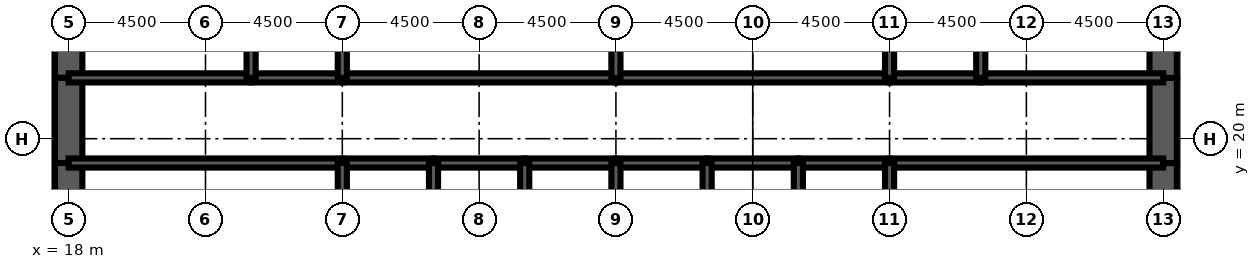
"""IFC4 building model, lengths in metres.
Left out: names, types, materials, properties, quantities, classifications, styles, units other than length and angle.
Written with IfcOpenShell. Run it as: python <this file> out.ifc"""

import sys

from ifc_helpers import new_model, si_unit, direction, frame, frame_2d, origin, place, context, subcontext, project, spatial, rectangle, extrude, element, fill, save


model = new_model("IFC4")
c1 = context("Model", 3, precision=1e-05, world=origin(), true_north=direction((0.0, 1.0)))
c2 = subcontext(c1, "Body", "Model", "MODEL_VIEW")
j1 = project(units=[si_unit("LENGTHUNIT", "METRE"), si_unit("PLANEANGLEUNIT", "RADIAN")], contexts=[c1])
p1 = place(None, origin())
s1 = spatial("IfcSite", under=j1, at=p1, CompositionType="ELEMENT")
p2 = place(p1, origin())
s2 = spatial("IfcBuilding", under=s1, at=p2, CompositionType="ELEMENT")
p3 = place(p2, frame((0.0, 0.0, 155.1)))
s3 = spatial("IfcBuildingStorey", under=s2, at=p3, CompositionType="ELEMENT", Elevation=155.1)
p4 = place(p3, frame((18.0, 26.0, 0.0), z_axis=(0.0, 0.0, 1.0), x_axis=(0.0, -1.0, 0.0)))
e1 = element("IfcWall", 1, at=p4, inside=s3, PredefinedType="SHEAR", context=c2, shape_type="SweptSolid", body=[
    extrude(rectangle(XDim=4.0, YDim=0.9, at=frame_2d((2.0, 0.0))), origin(), (0.0, 0.0, 1.0), 4.2),
])
p5 = place(p3, frame((18.0, 22.0, 0.0), z_axis=(0.0, 0.0, 1.0), x_axis=(0.0, -1.0, 0.0)))
e2 = element("IfcWall", 2, at=p5, inside=s3, PredefinedType="SHEAR", context=c2, shape_type="SweptSolid", body=[
    extrude(rectangle(XDim=2.8, YDim=0.9, at=frame_2d((1.4, 0.0))), origin(), (0.0, 0.0, 1.0), 4.2),
])
p6 = place(p5, frame((0.6, 0.0, 0.0)))
e3 = element("IfcOpeningElement", 3, at=p6, cuts=e2, PredefinedType="OPENING", context=c2, shape_type="SweptSolid", body=[
    extrude(rectangle(XDim=1.8, YDim=2.1, at=frame_2d((0.9, 1.05))), frame((0.0, 0.46, 0.0), z_axis=(0.0, -1.0, 0.0), x_axis=(1.0, 0.0, 0.0)), (0.0, 0.0, 1.0), 0.92),
])
for number, where, z_axis, x_axis in (
    (4, (18.0, 19.2, 0.0), (0.0, 0.0, 1.0), (0.0, -1.0, 0.0)),
    (5, (54.0, 16.0, 0.0), (0.0, 0.0, 1.0), (0.0, 1.0, 0.0)),
):
    element("IfcWall", number, at=place(p3, frame(where, z_axis=z_axis, x_axis=x_axis)), inside=s3, PredefinedType="SHEAR", context=c2, shape_type="SweptSolid", body=[
        extrude(rectangle(XDim=3.2, YDim=0.9, at=frame_2d((1.6, 0.0))), origin(), (0.0, 0.0, 1.0), 4.2),
    ])
p7 = place(p3, frame((54.0, 19.2, 0.0), z_axis=(0.0, 0.0, 1.0), x_axis=(0.0, 1.0, 0.0)))
e6 = element("IfcWall", 6, at=p7, inside=s3, PredefinedType="SHEAR", context=c2, shape_type="SweptSolid", body=[
    extrude(rectangle(XDim=2.8, YDim=0.9, at=frame_2d((1.4, 0.0))), origin(), (0.0, 0.0, 1.0), 4.2),
])
p8 = place(p7, frame((0.4, 0.0, 0.0)))
e7 = element("IfcOpeningElement", 7, at=p8, cuts=e6, PredefinedType="OPENING", context=c2, shape_type="SweptSolid", body=[
    extrude(rectangle(XDim=1.8, YDim=2.1, at=frame_2d((0.9, 1.05))), frame((0.0, 0.46, 0.0), z_axis=(0.0, -1.0, 0.0), x_axis=(1.0, 0.0, 0.0)), (0.0, 0.0, 1.0), 0.92),
])
p9 = place(p3, frame((54.0, 22.0, 0.0), z_axis=(0.0, 0.0, 1.0), x_axis=(0.0, 1.0, 0.0)))
e8 = element("IfcWall", 8, at=p9, inside=s3, PredefinedType="SHEAR", context=c2, shape_type="SweptSolid", body=[
    extrude(rectangle(XDim=4.0, YDim=0.9, at=frame_2d((2.0, 0.0))), origin(), (0.0, 0.0, 1.0), 4.2),
])
p10 = place(p3, frame((18.0, 19.2, 0.0), z_axis=(0.0, 0.0, 1.0), x_axis=(1.0, 0.0, 0.0)))
e9 = element("IfcWall", 9, at=p10, inside=s3, PredefinedType="SOLIDWALL", context=c2, shape_type="SweptSolid", body=[
    extrude(rectangle(XDim=9.0, YDim=0.3, at=frame_2d((4.5, 0.0))), origin(), (0.0, 0.0, 1.0), 4.2),
])
p11 = place(p10, frame((0.65, 0.0, 0.0)))
e10 = element("IfcOpeningElement", 10, at=p11, cuts=e9, PredefinedType="OPENING", context=c2, shape_type="SweptSolid", body=[
    extrude(rectangle(XDim=1.0, YDim=2.1, at=frame_2d((0.5, 1.05))), frame((0.0, 0.16, 0.0), z_axis=(0.0, -1.0, 0.0), x_axis=(1.0, 0.0, 0.0)), (0.0, 0.0, 1.0), 0.32),
])
p12 = place(p3, frame((27.0, 19.2, 0.0), z_axis=(0.0, 0.0, 1.0), x_axis=(1.0, 0.0, 0.0)))
e11 = element("IfcWall", 11, at=p12, inside=s3, PredefinedType="SOLIDWALL", context=c2, shape_type="SweptSolid", body=[
    extrude(rectangle(XDim=3.0, YDim=0.3, at=frame_2d((1.5, 0.0))), origin(), (0.0, 0.0, 1.0), 4.2),
])
p13 = place(p12, frame((0.95, 0.0, 0.0)))
e12 = element("IfcOpeningElement", 12, at=p13, cuts=e11, PredefinedType="OPENING", context=c2, shape_type="SweptSolid", body=[
    extrude(rectangle(XDim=1.1, YDim=2.2, at=frame_2d((0.55, 1.1))), frame((0.0, 0.16, 0.0), z_axis=(0.0, -1.0, 0.0), x_axis=(1.0, 0.0, 0.0)), (0.0, 0.0, 1.0), 0.32),
])
p14 = place(p3, frame((30.0, 19.2, 0.0), z_axis=(0.0, 0.0, 1.0), x_axis=(1.0, 0.0, 0.0)))
e13 = element("IfcWall", 13, at=p14, inside=s3, PredefinedType="SOLIDWALL", context=c2, shape_type="SweptSolid", body=[
    extrude(rectangle(XDim=3.0, YDim=0.3, at=frame_2d((1.5, 0.0))), origin(), (0.0, 0.0, 1.0), 4.2),
])
p15 = place(p14, frame((0.95, 0.0, 0.0)))
e14 = element("IfcOpeningElement", 14, at=p15, cuts=e13, PredefinedType="OPENING", context=c2, shape_type="SweptSolid", body=[
    extrude(rectangle(XDim=1.1, YDim=2.2, at=frame_2d((0.55, 1.1))), frame((0.0, 0.16, 0.0), z_axis=(0.0, -1.0, 0.0), x_axis=(1.0, 0.0, 0.0)), (0.0, 0.0, 1.0), 0.32),
])
p16 = place(p3, frame((33.0, 19.2, 0.0), z_axis=(0.0, 0.0, 1.0), x_axis=(1.0, 0.0, 0.0)))
e15 = element("IfcWall", 15, at=p16, inside=s3, PredefinedType="SOLIDWALL", context=c2, shape_type="SweptSolid", body=[
    extrude(rectangle(XDim=3.0, YDim=0.3, at=frame_2d((1.5, 0.0))), origin(), (0.0, 0.0, 1.0), 4.2),
])
p17 = place(p16, frame((0.95, 0.0, 0.0)))
e16 = element("IfcOpeningElement", 16, at=p17, cuts=e15, PredefinedType="OPENING", context=c2, shape_type="SweptSolid", body=[
    extrude(rectangle(XDim=1.1, YDim=2.2, at=frame_2d((0.55, 1.1))), frame((0.0, 0.16, 0.0), z_axis=(0.0, -1.0, 0.0), x_axis=(1.0, 0.0, 0.0)), (0.0, 0.0, 1.0), 0.32),
])
p18 = place(p3, frame((36.0, 19.2, 0.0), z_axis=(0.0, 0.0, 1.0), x_axis=(1.0, 0.0, 0.0)))
e17 = element("IfcWall", 17, at=p18, inside=s3, PredefinedType="SOLIDWALL", context=c2, shape_type="SweptSolid", body=[
    extrude(rectangle(XDim=3.0, YDim=0.3, at=frame_2d((1.5, 0.0))), origin(), (0.0, 0.0, 1.0), 4.2),
])
p19 = place(p18, frame((0.95, 0.0, 0.0)))
e18 = element("IfcOpeningElement", 18, at=p19, cuts=e17, PredefinedType="OPENING", context=c2, shape_type="SweptSolid", body=[
    extrude(rectangle(XDim=1.1, YDim=2.2, at=frame_2d((0.55, 1.1))), frame((0.0, 0.16, 0.0), z_axis=(0.0, -1.0, 0.0), x_axis=(1.0, 0.0, 0.0)), (0.0, 0.0, 1.0), 0.32),
])
p20 = place(p3, frame((39.0, 19.2, 0.0), z_axis=(0.0, 0.0, 1.0), x_axis=(1.0, 0.0, 0.0)))
e19 = element("IfcWall", 19, at=p20, inside=s3, PredefinedType="SOLIDWALL", context=c2, shape_type="SweptSolid", body=[
    extrude(rectangle(XDim=3.0, YDim=0.3, at=frame_2d((1.5, 0.0))), origin(), (0.0, 0.0, 1.0), 4.2),
])
p21 = place(p20, frame((1.0, 0.0, 0.0)))
e20 = element("IfcOpeningElement", 20, at=p21, cuts=e19, PredefinedType="OPENING", context=c2, shape_type="SweptSolid", body=[
    extrude(rectangle(XDim=1.0, YDim=2.1, at=frame_2d((0.5, 1.05))), frame((0.0, 0.16, 0.0), z_axis=(0.0, -1.0, 0.0), x_axis=(1.0, 0.0, 0.0)), (0.0, 0.0, 1.0), 0.32),
])
p22 = place(p3, frame((42.0, 19.2, 0.0), z_axis=(0.0, 0.0, 1.0), x_axis=(1.0, 0.0, 0.0)))
e21 = element("IfcWall", 21, at=p22, inside=s3, PredefinedType="SOLIDWALL", context=c2, shape_type="SweptSolid", body=[
    extrude(rectangle(XDim=3.0, YDim=0.3, at=frame_2d((1.5, 0.0))), origin(), (0.0, 0.0, 1.0), 4.2),
])
p23 = place(p3, frame((45.0, 19.2, 0.0), z_axis=(0.0, 0.0, 1.0), x_axis=(1.0, 0.0, 0.0)))
e22 = element("IfcWall", 22, at=p23, inside=s3, PredefinedType="SOLIDWALL", context=c2, shape_type="SweptSolid", body=[
    extrude(rectangle(XDim=9.0, YDim=0.3, at=frame_2d((4.5, 0.0))), origin(), (0.0, 0.0, 1.0), 4.2),
])
p24 = place(p23, frame((7.35, 0.0, 0.0)))
e23 = element("IfcOpeningElement", 23, at=p24, cuts=e22, PredefinedType="OPENING", context=c2, shape_type="SweptSolid", body=[
    extrude(rectangle(XDim=1.0, YDim=2.1, at=frame_2d((0.5, 1.05))), frame((0.0, 0.16, 0.0), z_axis=(0.0, -1.0, 0.0), x_axis=(1.0, 0.0, 0.0)), (0.0, 0.0, 1.0), 0.32),
])
p25 = place(p3, frame((18.0, 22.0, 0.0), z_axis=(0.0, 0.0, 1.0), x_axis=(1.0, 0.0, 0.0)))
e24 = element("IfcWall", 24, at=p25, inside=s3, PredefinedType="SOLIDWALL", context=c2, shape_type="SweptSolid", body=[
    extrude(rectangle(XDim=6.0, YDim=0.3, at=frame_2d((3.0, 0.0))), origin(), (0.0, 0.0, 1.0), 4.2),
])
p26 = place(p25, frame((2.0, 0.0, 0.0)))
e25 = element("IfcOpeningElement", 25, at=p26, cuts=e24, PredefinedType="OPENING", context=c2, shape_type="SweptSolid", body=[
    extrude(rectangle(XDim=1.0, YDim=2.1, at=frame_2d((0.5, 1.05))), frame((0.0, 0.16, 0.0), z_axis=(0.0, -1.0, 0.0), x_axis=(1.0, 0.0, 0.0)), (0.0, 0.0, 1.0), 0.32),
])
p27 = place(p3, frame((24.0, 22.0, 0.0), z_axis=(0.0, 0.0, 1.0), x_axis=(1.0, 0.0, 0.0)))
e26 = element("IfcWall", 26, at=p27, inside=s3, PredefinedType="SOLIDWALL", context=c2, shape_type="SweptSolid", body=[
    extrude(rectangle(XDim=3.0, YDim=0.3, at=frame_2d((1.5, 0.0))), origin(), (0.0, 0.0, 1.0), 4.2),
])
p28 = place(p27, frame((1.0, 0.0, 0.0)))
e27 = element("IfcOpeningElement", 27, at=p28, cuts=e26, PredefinedType="OPENING", context=c2, shape_type="SweptSolid", body=[
    extrude(rectangle(XDim=1.0, YDim=2.1, at=frame_2d((0.5, 1.05))), frame((0.0, 0.16, 0.0), z_axis=(0.0, -1.0, 0.0), x_axis=(1.0, 0.0, 0.0)), (0.0, 0.0, 1.0), 0.32),
])
p29 = place(p3, frame((27.0, 22.0, 0.0), z_axis=(0.0, 0.0, 1.0), x_axis=(1.0, 0.0, 0.0)))
e28 = element("IfcWall", 28, at=p29, inside=s3, PredefinedType="SOLIDWALL", context=c2, shape_type="SweptSolid", body=[
    extrude(rectangle(XDim=9.0, YDim=0.3, at=frame_2d((4.5, 0.0))), origin(), (0.0, 0.0, 1.0), 4.2),
])
p30 = place(p29, frame((4.0, 0.0, 0.0)))
e29 = element("IfcOpeningElement", 29, at=p30, cuts=e28, PredefinedType="OPENING", context=c2, shape_type="SweptSolid", body=[
    extrude(rectangle(XDim=1.0, YDim=2.1, at=frame_2d((0.5, 1.05))), frame((0.0, 0.16, 0.0), z_axis=(0.0, -1.0, 0.0), x_axis=(1.0, 0.0, 0.0)), (0.0, 0.0, 1.0), 0.32),
])
p31 = place(p3, frame((36.0, 22.0, 0.0), z_axis=(0.0, 0.0, 1.0), x_axis=(1.0, 0.0, 0.0)))
e30 = element("IfcWall", 30, at=p31, inside=s3, PredefinedType="SOLIDWALL", context=c2, shape_type="SweptSolid", body=[
    extrude(rectangle(XDim=9.0, YDim=0.3, at=frame_2d((4.5, 0.0))), origin(), (0.0, 0.0, 1.0), 4.2),
])
p32 = place(p31, frame((4.0, 0.0, 0.0)))
e31 = element("IfcOpeningElement", 31, at=p32, cuts=e30, PredefinedType="OPENING", context=c2, shape_type="SweptSolid", body=[
    extrude(rectangle(XDim=1.0, YDim=2.1, at=frame_2d((0.5, 1.05))), frame((0.0, 0.16, 0.0), z_axis=(0.0, -1.0, 0.0), x_axis=(1.0, 0.0, 0.0)), (0.0, 0.0, 1.0), 0.32),
])
p33 = place(p3, frame((45.0, 22.0, 0.0), z_axis=(0.0, 0.0, 1.0), x_axis=(1.0, 0.0, 0.0)))
e32 = element("IfcWall", 32, at=p33, inside=s3, PredefinedType="SOLIDWALL", context=c2, shape_type="SweptSolid", body=[
    extrude(rectangle(XDim=3.0, YDim=0.3, at=frame_2d((1.5, 0.0))), origin(), (0.0, 0.0, 1.0), 4.2),
])
p34 = place(p33, frame((1.0, 0.0, 0.0)))
e33 = element("IfcOpeningElement", 33, at=p34, cuts=e32, PredefinedType="OPENING", context=c2, shape_type="SweptSolid", body=[
    extrude(rectangle(XDim=1.0, YDim=2.1, at=frame_2d((0.5, 1.05))), frame((0.0, 0.16, 0.0), z_axis=(0.0, -1.0, 0.0), x_axis=(1.0, 0.0, 0.0)), (0.0, 0.0, 1.0), 0.32),
])
p35 = place(p3, frame((48.0, 22.0, 0.0), z_axis=(0.0, 0.0, 1.0), x_axis=(1.0, 0.0, 0.0)))
e34 = element("IfcWall", 34, at=p35, inside=s3, PredefinedType="SOLIDWALL", context=c2, shape_type="SweptSolid", body=[
    extrude(rectangle(XDim=6.0, YDim=0.3, at=frame_2d((3.0, 0.0))), origin(), (0.0, 0.0, 1.0), 4.2),
])
p36 = place(p35, frame((2.0, 0.0, 0.0)))
e35 = element("IfcOpeningElement", 35, at=p36, cuts=e34, PredefinedType="OPENING", context=c2, shape_type="SweptSolid", body=[
    extrude(rectangle(XDim=1.0, YDim=2.1, at=frame_2d((0.5, 1.05))), frame((0.0, 0.16, 0.0), z_axis=(0.0, -1.0, 0.0), x_axis=(1.0, 0.0, 0.0)), (0.0, 0.0, 1.0), 0.32),
])
p37 = place(p35, frame((4.0, 0.0, 0.0)))
e36 = element("IfcOpeningElement", 36, at=p37, cuts=e34, PredefinedType="OPENING", context=c2, shape_type="SweptSolid", body=[
    extrude(rectangle(XDim=1.0, YDim=2.1, at=frame_2d((0.5, 1.05))), frame((0.0, 0.16, 0.0), z_axis=(0.0, -1.0, 0.0), x_axis=(1.0, 0.0, 0.0)), (0.0, 0.0, 1.0), 0.32),
])
for number, where, z_axis, x_axis in (
    (37, (27.0, 16.0, 0.0), (0.0, 0.0, 1.0), (0.0, 1.0, 0.0)),
    (38, (30.0, 16.0, 0.0), (0.0, 0.0, 1.0), (0.0, 1.0, 0.0)),
    (39, (33.0, 16.0, 0.0), (0.0, 0.0, 1.0), (0.0, 1.0, 0.0)),
    (40, (36.0, 16.0, 0.0), (0.0, 0.0, 1.0), (0.0, 1.0, 0.0)),
    (41, (39.0, 16.0, 0.0), (0.0, 0.0, 1.0), (0.0, 1.0, 0.0)),
    (42, (42.0, 16.0, 0.0), (0.0, 0.0, 1.0), (0.0, 1.0, 0.0)),
    (43, (45.0, 16.0, 0.0), (0.0, 0.0, 1.0), (0.0, 1.0, 0.0)),
):
    element("IfcWall", number, at=place(p3, frame(where, z_axis=z_axis, x_axis=x_axis)), inside=s3, PredefinedType="SOLIDWALL", context=c2, shape_type="SweptSolid", body=[
        extrude(rectangle(XDim=3.2, YDim=0.3, at=frame_2d((1.6, 0.0))), origin(), (0.0, 0.0, 1.0), 4.2),
    ])
for number, where, z_axis, x_axis in (
    (44, (24.0, 22.0, 0.0), (0.0, 0.0, 1.0), (0.0, 1.0, 0.0)),
    (45, (27.0, 22.0, 0.0), (0.0, 0.0, 1.0), (0.0, 1.0, 0.0)),
    (46, (36.0, 22.0, 0.0), (0.0, 0.0, 1.0), (0.0, 1.0, 0.0)),
    (47, (45.0, 22.0, 0.0), (0.0, 0.0, 1.0), (0.0, 1.0, 0.0)),
    (48, (48.0, 22.0, 0.0), (0.0, 0.0, 1.0), (0.0, 1.0, 0.0)),
):
    element("IfcWall", number, at=place(p3, frame(where, z_axis=z_axis, x_axis=x_axis)), inside=s3, PredefinedType="SOLIDWALL", context=c2, shape_type="SweptSolid", body=[
        extrude(rectangle(XDim=4.0, YDim=0.3, at=frame_2d((2.0, 0.0))), origin(), (0.0, 0.0, 1.0), 4.2),
    ])
p38 = place(p3, frame((38.0, 22.15, 0.0), z_axis=(0.0, 0.0, 1.0), x_axis=(0.0, 1.0, 0.0)))
e49 = element("IfcWall", 49, at=p38, inside=s3, PredefinedType="PARTITIONING", context=c2, shape_type="SweptSolid", body=[
    extrude(rectangle(XDim=3.7, YDim=0.15, at=frame_2d((1.85, 0.0))), origin(), (0.0, 0.0, 1.0), 3.0),
])
p39 = place(p38, frame((2.2, 0.0, 0.0)))
e50 = element("IfcOpeningElement", 50, at=p39, cuts=e49, PredefinedType="OPENING", context=c2, shape_type="SweptSolid", body=[
    extrude(rectangle(XDim=1.0, YDim=2.1, at=frame_2d((0.5, 1.05))), frame((0.0, 0.085, 0.0), z_axis=(0.0, -1.0, 0.0), x_axis=(1.0, 0.0, 0.0)), (0.0, 0.0, 1.0), 0.17),
])
p40 = place(p3, frame((51.375, 22.15, 0.0), z_axis=(0.0, 0.0, 1.0), x_axis=(0.0, 1.0, 0.0)))
e51 = element("IfcWall", 51, at=p40, inside=s3, PredefinedType="PARTITIONING", context=c2, shape_type="SweptSolid", body=[
    extrude(rectangle(XDim=3.7, YDim=0.15, at=frame_2d((1.85, 0.0))), origin(), (0.0, 0.0, 1.0), 3.0),
])
p41 = place(p13, origin())
e52 = element("IfcDoor", 52, at=p41, inside=s3, OperationType="DOUBLE_DOOR_SLIDING", PredefinedType="USERDEFINED", context=c2, shape_type="SweptSolid", body=[
    extrude(rectangle(XDim=1.1, YDim=2.2, at=frame_2d((0.55, 1.1))), frame((0.0, 0.025, 0.0), z_axis=(0.0, -1.0, 0.0), x_axis=(1.0, 0.0, 0.0)), (0.0, 0.0, 1.0), 0.05),
])
fill(e12, e52)
p42 = place(p15, origin())
e53 = element("IfcDoor", 53, at=p42, inside=s3, OperationType="DOUBLE_DOOR_SLIDING", PredefinedType="USERDEFINED", context=c2, shape_type="SweptSolid", body=[
    extrude(rectangle(XDim=1.1, YDim=2.2, at=frame_2d((0.55, 1.1))), frame((0.0, 0.025, 0.0), z_axis=(0.0, -1.0, 0.0), x_axis=(1.0, 0.0, 0.0)), (0.0, 0.0, 1.0), 0.05),
])
fill(e14, e53)
p43 = place(p17, origin())
e54 = element("IfcDoor", 54, at=p43, inside=s3, OperationType="DOUBLE_DOOR_SLIDING", PredefinedType="USERDEFINED", context=c2, shape_type="SweptSolid", body=[
    extrude(rectangle(XDim=1.1, YDim=2.2, at=frame_2d((0.55, 1.1))), frame((0.0, 0.025, 0.0), z_axis=(0.0, -1.0, 0.0), x_axis=(1.0, 0.0, 0.0)), (0.0, 0.0, 1.0), 0.05),
])
fill(e16, e54)
p44 = place(p19, origin())
e55 = element("IfcDoor", 55, at=p44, inside=s3, OperationType="DOUBLE_DOOR_SLIDING", PredefinedType="USERDEFINED", context=c2, shape_type="SweptSolid", body=[
    extrude(rectangle(XDim=1.1, YDim=2.2, at=frame_2d((0.55, 1.1))), frame((0.0, 0.025, 0.0), z_axis=(0.0, -1.0, 0.0), x_axis=(1.0, 0.0, 0.0)), (0.0, 0.0, 1.0), 0.05),
])
fill(e18, e55)
p45 = place(p11, origin())
e56 = element("IfcDoor", 56, at=p45, inside=s3, OperationType="SINGLE_SWING_LEFT", PredefinedType="DOOR", context=c2, shape_type="SweptSolid", body=[
    extrude(rectangle(XDim=1.0, YDim=2.1, at=frame_2d((0.5, 1.05))), frame((0.0, 0.025, 0.0), z_axis=(0.0, -1.0, 0.0), x_axis=(1.0, 0.0, 0.0)), (0.0, 0.0, 1.0), 0.05),
])
fill(e10, e56)
p46 = place(p24, origin())
e57 = element("IfcDoor", 57, at=p46, inside=s3, OperationType="SINGLE_SWING_RIGHT", PredefinedType="DOOR", context=c2, shape_type="SweptSolid", body=[
    extrude(rectangle(XDim=1.0, YDim=2.1, at=frame_2d((0.5, 1.05))), frame((0.0, 0.025, 0.0), z_axis=(0.0, -1.0, 0.0), x_axis=(1.0, 0.0, 0.0)), (0.0, 0.0, 1.0), 0.05),
])
fill(e23, e57)
p47 = place(p6, origin())
e58 = element("IfcDoor", 58, at=p47, inside=s3, OperationType="SINGLE_SWING_LEFT", PredefinedType="DOOR", context=c2, shape_type="SweptSolid", body=[
    extrude(rectangle(XDim=1.8, YDim=2.1, at=frame_2d((0.9, 1.05))), frame((0.0, 0.45, 0.0), z_axis=(0.0, -1.0, 0.0), x_axis=(1.0, 0.0, 0.0)), (0.0, 0.0, 1.0), 0.899),
])
fill(e3, e58)
p48 = place(p8, origin())
e59 = element("IfcDoor", 59, at=p48, inside=s3, OperationType="SINGLE_SWING_LEFT", PredefinedType="DOOR", context=c2, shape_type="SweptSolid", body=[
    extrude(rectangle(XDim=1.8, YDim=2.1, at=frame_2d((0.9, 1.05))), frame((0.0, 0.45, 0.0), z_axis=(0.0, -1.0, 0.0), x_axis=(1.0, 0.0, 0.0)), (0.0, 0.0, 1.0), 0.899),
])
fill(e7, e59)
p49 = place(p26, origin())
e60 = element("IfcDoor", 60, at=p49, inside=s3, OperationType="SINGLE_SWING_LEFT", PredefinedType="DOOR", context=c2, shape_type="SweptSolid", body=[
    extrude(rectangle(XDim=1.0, YDim=2.1, at=frame_2d((0.5, 1.05))), frame((0.0, 0.025, 0.0), z_axis=(0.0, -1.0, 0.0), x_axis=(1.0, 0.0, 0.0)), (0.0, 0.0, 1.0), 0.05),
])
fill(e25, e60)
p50 = place(p28, origin())
e61 = element("IfcDoor", 61, at=p50, inside=s3, OperationType="SINGLE_SWING_LEFT", PredefinedType="DOOR", context=c2, shape_type="SweptSolid", body=[
    extrude(rectangle(XDim=1.0, YDim=2.1, at=frame_2d((0.5, 1.05))), frame((0.0, 0.025, 0.0), z_axis=(0.0, -1.0, 0.0), x_axis=(1.0, 0.0, 0.0)), (0.0, 0.0, 1.0), 0.05),
])
fill(e27, e61)
p51 = place(p30, origin())
e62 = element("IfcDoor", 62, at=p51, inside=s3, OperationType="SINGLE_SWING_LEFT", PredefinedType="DOOR", context=c2, shape_type="SweptSolid", body=[
    extrude(rectangle(XDim=1.0, YDim=2.1, at=frame_2d((0.5, 1.05))), frame((0.0, 0.025, 0.0), z_axis=(0.0, -1.0, 0.0), x_axis=(1.0, 0.0, 0.0)), (0.0, 0.0, 1.0), 0.05),
])
fill(e29, e62)
p52 = place(p32, origin())
e63 = element("IfcDoor", 63, at=p52, inside=s3, OperationType="SINGLE_SWING_LEFT", PredefinedType="DOOR", context=c2, shape_type="SweptSolid", body=[
    extrude(rectangle(XDim=1.0, YDim=2.1, at=frame_2d((0.5, 1.05))), frame((0.0, 0.025, 0.0), z_axis=(0.0, -1.0, 0.0), x_axis=(1.0, 0.0, 0.0)), (0.0, 0.0, 1.0), 0.05),
])
fill(e31, e63)
p53 = place(p34, origin())
e64 = element("IfcDoor", 64, at=p53, inside=s3, OperationType="SINGLE_SWING_LEFT", PredefinedType="DOOR", context=c2, shape_type="SweptSolid", body=[
    extrude(rectangle(XDim=1.0, YDim=2.1, at=frame_2d((0.5, 1.05))), frame((0.0, 0.025, 0.0), z_axis=(0.0, -1.0, 0.0), x_axis=(1.0, 0.0, 0.0)), (0.0, 0.0, 1.0), 0.05),
])
fill(e33, e64)
p54 = place(p36, origin())
e65 = element("IfcDoor", 65, at=p54, inside=s3, OperationType="SINGLE_SWING_LEFT", PredefinedType="DOOR", context=c2, shape_type="SweptSolid", body=[
    extrude(rectangle(XDim=1.0, YDim=2.1, at=frame_2d((0.5, 1.05))), frame((0.0, 0.025, 0.0), z_axis=(0.0, -1.0, 0.0), x_axis=(1.0, 0.0, 0.0)), (0.0, 0.0, 1.0), 0.05),
])
fill(e35, e65)
p55 = place(p37, origin())
e66 = element("IfcDoor", 66, at=p55, inside=s3, OperationType="SINGLE_SWING_RIGHT", PredefinedType="DOOR", context=c2, shape_type="SweptSolid", body=[
    extrude(rectangle(XDim=1.0, YDim=2.1, at=frame_2d((0.5, 1.05))), frame((0.0, 0.025, 0.0), z_axis=(0.0, -1.0, 0.0), x_axis=(1.0, 0.0, 0.0)), (0.0, 0.0, 1.0), 0.05),
])
fill(e36, e66)
p56 = place(p21, origin())
e67 = element("IfcDoor", 67, at=p56, inside=s3, OperationType="SINGLE_SWING_LEFT", PredefinedType="DOOR", context=c2, shape_type="SweptSolid", body=[
    extrude(rectangle(XDim=1.0, YDim=2.1, at=frame_2d((0.5, 1.05))), frame((0.0, 0.025, 0.0), z_axis=(0.0, -1.0, 0.0), x_axis=(1.0, 0.0, 0.0)), (0.0, 0.0, 1.0), 0.05),
])
fill(e20, e67)
save(model, sys.argv[1])
